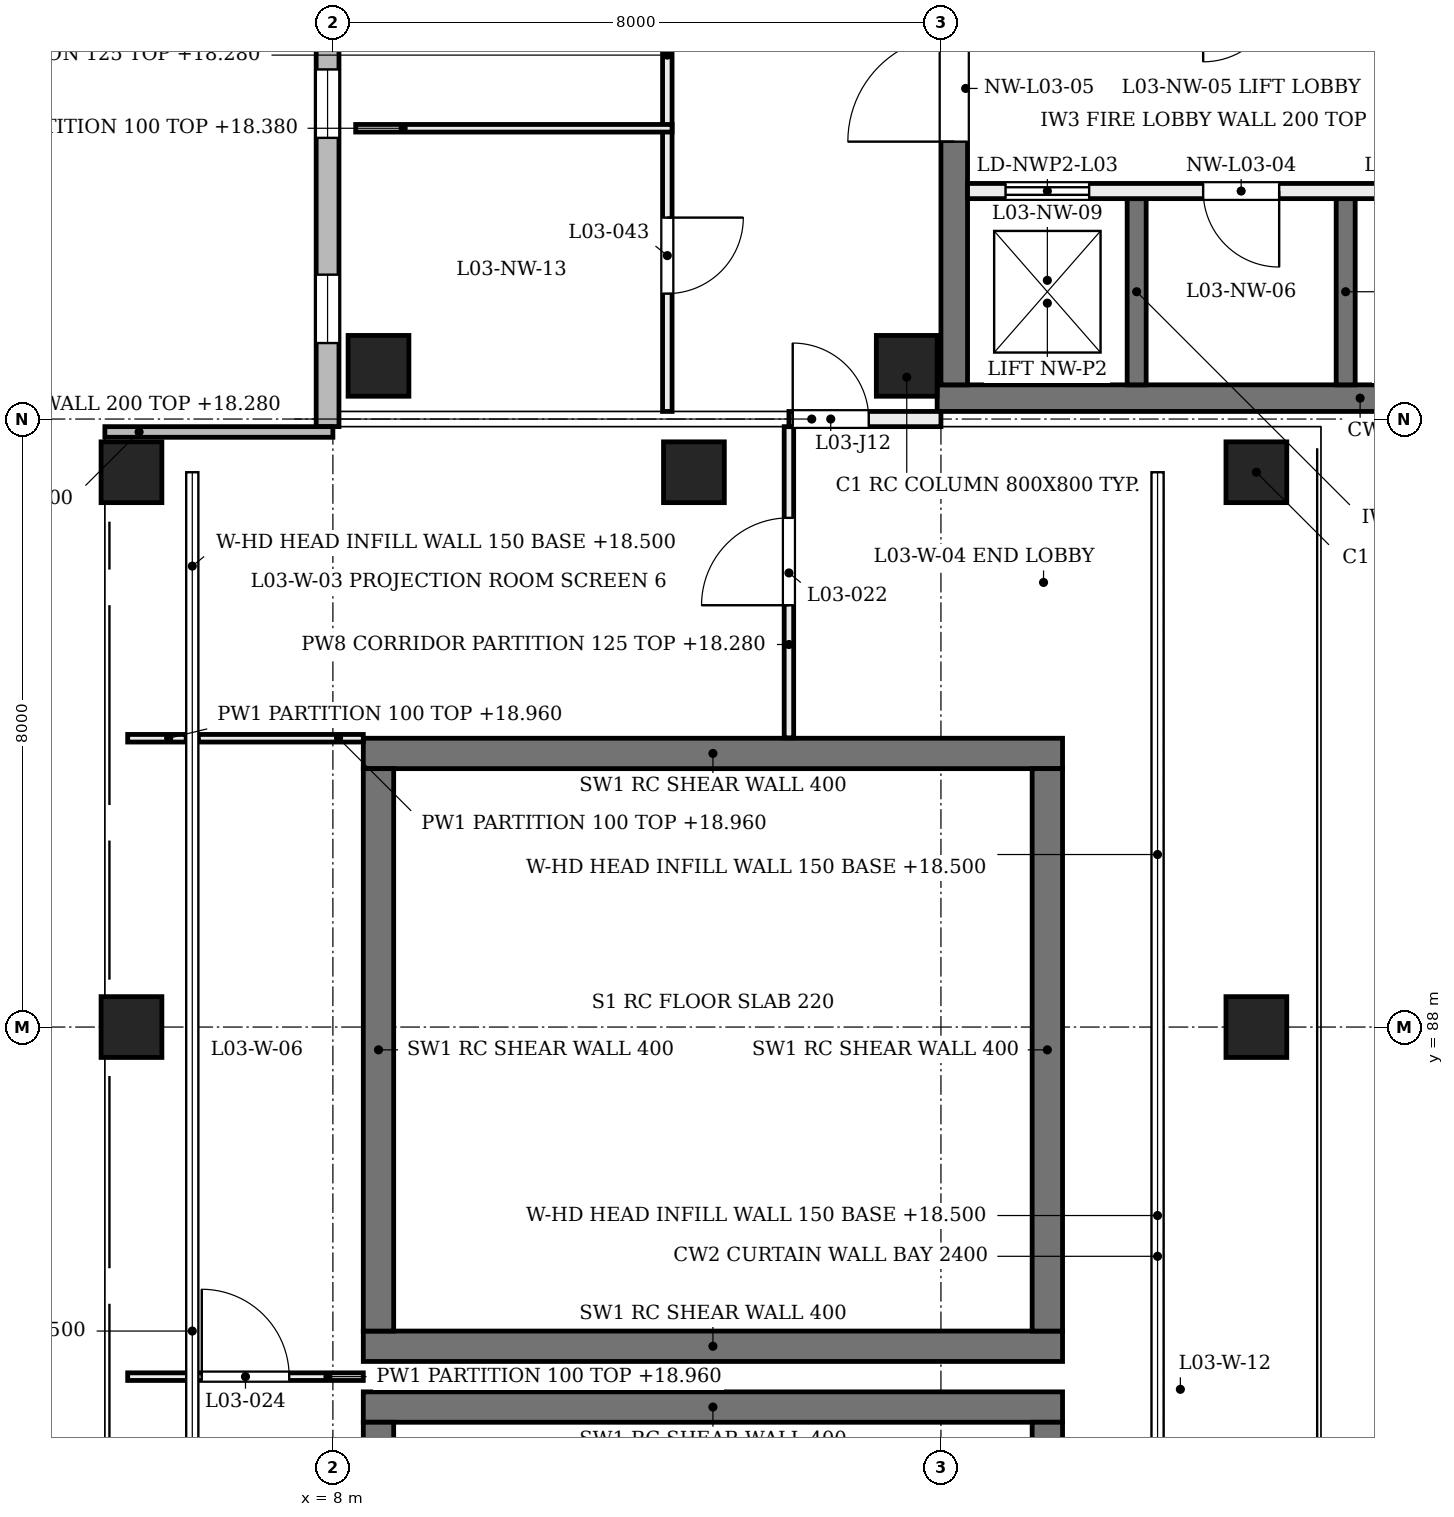
"""IFC4 building model, lengths in metres.
Left out: names, types, materials, properties, quantities, classifications, styles, units other than length and angle.
Written with IfcOpenShell. Run it as: python <this file> out.ifc"""

import sys

from ifc_helpers import new_model, si_unit, direction, frame, frame_2d, origin, origin_2d, place, context, subcontext, project, spatial, rectangle, extrude, element, fill, save


model = new_model("IFC4")
c1 = context("Model", 3, precision=1e-05, world=origin(), true_north=direction((0.0, 1.0)))
c2 = subcontext(c1, "Body", "Model", "MODEL_VIEW")
j1 = project(units=[si_unit("LENGTHUNIT", "METRE"), si_unit("PLANEANGLEUNIT", "RADIAN")], contexts=[c1])
p1 = place(None, origin())
s1 = spatial("IfcSite", under=j1, at=p1, CompositionType="ELEMENT")
p2 = place(p1, origin())
s2 = spatial("IfcBuilding", under=s1, at=p2, CompositionType="ELEMENT")
p3 = place(p2, frame((0.0, 0.0, 14.4)))
s3 = spatial("IfcBuildingStorey", under=s2, at=p3, CompositionType="ELEMENT", Elevation=14.4)
p4 = place(p3, frame((8.4, 83.0, 0.0), z_axis=(0.0, 0.0, 1.0), x_axis=(1.0, 0.0, 0.0)))
e1 = element("IfcWall", 1, at=p4, inside=s3, PredefinedType="SHEAR", context=c2, shape_type="SweptSolid", body=[
    extrude(rectangle(XDim=9.2, YDim=0.4, at=frame_2d((4.6, 0.0))), origin(), (0.0, 0.0, 1.0), 4.58),
])
for number, where, z_axis, x_axis in (
    (2, (8.6, 75.8, 0.0), (0.0, 0.0, 1.0), (0.0, 1.0, 0.0)),
    (3, (17.4, 75.8, 0.0), (0.0, 0.0, 1.0), (0.0, 1.0, 0.0)),
):
    element("IfcWall", number, at=place(p3, frame(where, z_axis=z_axis, x_axis=x_axis)), inside=s3, PredefinedType="SHEAR", context=c2, shape_type="SweptSolid", body=[
        extrude(rectangle(XDim=7.0, YDim=0.4, at=frame_2d((3.5, 0.0))), origin(), (0.0, 0.0, 1.0), 4.58),
    ])
for number, where, z_axis, x_axis in (
    (4, (8.4, 83.8, 0.0), (0.0, 0.0, 1.0), (1.0, 0.0, 0.0)),
    (5, (8.4, 91.6, 0.0), (0.0, 0.0, 1.0), (1.0, 0.0, 0.0)),
):
    element("IfcWall", number, at=place(p3, frame(where, z_axis=z_axis, x_axis=x_axis)), inside=s3, PredefinedType="SHEAR", context=c2, shape_type="SweptSolid", body=[
        extrude(rectangle(XDim=9.2, YDim=0.4, at=frame_2d((4.6, 0.0))), origin(), (0.0, 0.0, 1.0), 4.58),
    ])
for number, where, z_axis, x_axis in (
    (6, (8.6, 84.0, 0.0), (0.0, 0.0, 1.0), (0.0, 1.0, 0.0)),
    (7, (17.4, 84.0, 0.0), (0.0, 0.0, 1.0), (0.0, 1.0, 0.0)),
):
    element("IfcWall", number, at=place(p3, frame(where, z_axis=z_axis, x_axis=x_axis)), inside=s3, PredefinedType="SHEAR", context=c2, shape_type="SweptSolid", body=[
        extrude(rectangle(XDim=7.4, YDim=0.4, at=frame_2d((3.7, 0.0))), origin(), (0.0, 0.0, 1.0), 4.58),
    ])
p5 = place(p3, frame((15.95, 96.275, 0.0), z_axis=(0.0, 0.0, 1.0), x_axis=(1.0, 0.0, 0.0)))
e8 = element("IfcWall", 8, at=p5, inside=s3, PredefinedType="SHEAR", context=c2, shape_type="SweptSolid", body=[
    extrude(rectangle(XDim=7.95, YDim=0.35, at=frame_2d((3.975, 0.0))), origin(), (0.0, 0.0, 1.0), 4.58),
])
p6 = place(p3, frame((16.175, 96.45, 0.0), z_axis=(0.0, 0.0, 1.0), x_axis=(0.0, 1.0, 0.0)))
e9 = element("IfcWall", 9, at=p6, inside=s3, PredefinedType="SHEAR", context=c2, shape_type="SweptSolid", body=[
    extrude(rectangle(XDim=15.2, YDim=0.35, at=frame_2d((7.6, 0.0))), origin(), (0.0, 0.0, 1.0), 4.58),
])
p7 = place(p6, frame((13.25, 0.0, 0.0)))
e10 = element("IfcOpeningElement", 10, at=p7, cuts=e9, PredefinedType="OPENING", context=c2, shape_type="SweptSolid", body=[
    extrude(rectangle(XDim=1.0, YDim=2.1, at=frame_2d((0.5, 1.05))), frame((0.0, 0.185, 0.0), z_axis=(0.0, -1.0, 0.0), x_axis=(1.0, 0.0, 0.0)), (0.0, 0.0, 1.0), 0.37),
])
p8 = place(p6, frame((3.2, 0.0, 0.0)))
e11 = element("IfcOpeningElement", 11, at=p8, cuts=e9, PredefinedType="OPENING", context=c2, shape_type="SweptSolid", body=[
    extrude(rectangle(XDim=1.4, YDim=2.1, at=frame_2d((0.7, 1.05))), frame((0.0, 0.185, 0.0), z_axis=(0.0, -1.0, 0.0), x_axis=(1.0, 0.0, 0.0)), (0.0, 0.0, 1.0), 0.37),
])
for number, where, z_axis, x_axis in (
    (12, (8.6, 96.7, 0.0), (0.0, 0.0, 1.0), (1.0, 0.0, 0.0)),
    (13, (15.55, 96.7, 0.0), (0.0, 0.0, 1.0), (1.0, 0.0, 0.0)),
):
    element("IfcColumn", number, at=place(p3, frame(where, z_axis=z_axis, x_axis=x_axis)), inside=s3, PredefinedType="COLUMN", context=c2, shape_type="SweptSolid", body=[
        extrude(rectangle(XDim=0.8, YDim=0.8, at=origin_2d()), origin(), (0.0, 0.0, 1.0), 4.8),
    ])
for number, where, z_axis, x_axis in (
    (14, (5.6, 88.0, 0.0), (-0.204, 0.0, 0.979), (0.0, -1.0, 0.0)),
    (15, (5.6, 95.3, 0.0), (-0.204, 0.0, 0.979), (0.0, -1.0, 0.0)),
    (16, (13.0, 95.3, 0.0), (-0.204, 0.0, 0.979), (0.0, -1.0, 0.0)),
    (17, (20.4, 88.0, 0.0), (-0.204, 0.0, 0.979), (0.0, -1.0, 0.0)),
    (18, (20.4, 95.3, 0.0), (-0.204, 0.0, 0.979), (0.0, -1.0, 0.0)),
):
    element("IfcColumn", number, at=place(p3, frame(where, z_axis=z_axis, x_axis=x_axis)), inside=s3, PredefinedType="COLUMN", context=c2, shape_type="SweptSolid", body=[
        extrude(rectangle(XDim=0.8, YDim=0.8, at=origin_2d()), origin(), (0.0, 0.0, 1.0), 4.903),
    ])
p9 = place(p3, frame((6.15, 80.2, 4.1), z_axis=(0.0, 0.0, 1.0), x_axis=(0.0, 1.0, 0.0)))
e19 = element("IfcWall", 19, at=p9, inside=s3, PredefinedType="SOLIDWALL", context=c2, shape_type="SweptSolid", body=[
    extrude(rectangle(XDim=7.6, YDim=0.15, at=frame_2d((3.8, 0.0))), origin(), (0.0, 0.0, 1.0), 0.48),
])
p10 = place(p3, frame((6.15, 88.2, 4.1), z_axis=(0.0, 0.0, 1.0), x_axis=(0.0, 1.0, 0.0)))
e20 = element("IfcWall", 20, at=p10, inside=s3, PredefinedType="SOLIDWALL", context=c2, shape_type="SweptSolid", body=[
    extrude(rectangle(XDim=6.9, YDim=0.15, at=frame_2d((3.45, 0.0))), origin(), (0.0, 0.0, 1.0), 0.48),
])
p11 = place(p3, frame((18.85, 80.2, 4.1), z_axis=(0.0, 0.0, 1.0), x_axis=(0.0, 1.0, 0.0)))
e21 = element("IfcWall", 21, at=p11, inside=s3, PredefinedType="SOLIDWALL", context=c2, shape_type="SweptSolid", body=[
    extrude(rectangle(XDim=7.6, YDim=0.15, at=frame_2d((3.8, 0.0))), origin(), (0.0, 0.0, 1.0), 0.48),
])
p12 = place(p3, frame((18.85, 88.2, 4.1), z_axis=(0.0, 0.0, 1.0), x_axis=(0.0, 1.0, 0.0)))
e22 = element("IfcWall", 22, at=p12, inside=s3, PredefinedType="SOLIDWALL", context=c2, shape_type="SweptSolid", body=[
    extrude(rectangle(XDim=6.9, YDim=0.15, at=frame_2d((3.45, 0.0))), origin(), (0.0, 0.0, 1.0), 0.48),
])
p13 = place(p3, frame((7.93, 95.9, 0.0), z_axis=(0.0, 0.0, 1.0), x_axis=(0.0, 1.0, 0.0)))
e23 = element("IfcWall", 23, at=p13, inside=s3, PredefinedType="SOLIDWALL", context=c2, shape_type="SweptSolid", body=[
    extrude(rectangle(XDim=16.4, YDim=0.3, at=frame_2d((8.2, 0.0))), origin(), (0.0, 0.0, 1.0), 3.9),
])
p14 = place(p13, frame((1.1, 0.0, 0.75)))
e24 = element("IfcOpeningElement", 24, at=p14, cuts=e23, PredefinedType="OPENING", context=c2, shape_type="SweptSolid", body=[
    extrude(rectangle(XDim=0.9, YDim=3.1, at=frame_2d((0.45, 1.55))), frame((0.0, 0.16, 0.0), z_axis=(0.0, -1.0, 0.0), x_axis=(1.0, 0.0, 0.0)), (0.0, 0.0, 1.0), 0.32),
])
p15 = place(p13, frame((3.8, 0.0, 0.75)))
e25 = element("IfcOpeningElement", 25, at=p15, cuts=e23, PredefinedType="OPENING", context=c2, shape_type="SweptSolid", body=[
    extrude(rectangle(XDim=0.9, YDim=3.1, at=frame_2d((0.45, 1.55))), frame((0.0, 0.16, 0.0), z_axis=(0.0, -1.0, 0.0), x_axis=(1.0, 0.0, 0.0)), (0.0, 0.0, 1.0), 0.32),
])
p16 = place(p13, frame((6.5, 0.0, 0.75)))
e26 = element("IfcOpeningElement", 26, at=p16, cuts=e23, PredefinedType="OPENING", context=c2, shape_type="SweptSolid", body=[
    extrude(rectangle(XDim=0.9, YDim=3.1, at=frame_2d((0.45, 1.55))), frame((0.0, 0.16, 0.0), z_axis=(0.0, -1.0, 0.0), x_axis=(1.0, 0.0, 0.0)), (0.0, 0.0, 1.0), 0.32),
])
p17 = place(p13, frame((9.2, 0.0, 0.75)))
e27 = element("IfcOpeningElement", 27, at=p17, cuts=e23, PredefinedType="OPENING", context=c2, shape_type="SweptSolid", body=[
    extrude(rectangle(XDim=0.9, YDim=3.1, at=frame_2d((0.45, 1.55))), frame((0.0, 0.16, 0.0), z_axis=(0.0, -1.0, 0.0), x_axis=(1.0, 0.0, 0.0)), (0.0, 0.0, 1.0), 0.32),
])
p18 = place(p13, frame((11.9, 0.0, 0.75)))
e28 = element("IfcOpeningElement", 28, at=p18, cuts=e23, PredefinedType="OPENING", context=c2, shape_type="SweptSolid", body=[
    extrude(rectangle(XDim=0.9, YDim=3.1, at=frame_2d((0.45, 1.55))), frame((0.0, 0.16, 0.0), z_axis=(0.0, -1.0, 0.0), x_axis=(1.0, 0.0, 0.0)), (0.0, 0.0, 1.0), 0.32),
])
p19 = place(p13, frame((14.6, 0.0, 0.75)))
e29 = element("IfcOpeningElement", 29, at=p19, cuts=e23, PredefinedType="OPENING", context=c2, shape_type="SweptSolid", body=[
    extrude(rectangle(XDim=0.9, YDim=3.1, at=frame_2d((0.45, 1.55))), frame((0.0, 0.16, 0.0), z_axis=(0.0, -1.0, 0.0), x_axis=(1.0, 0.0, 0.0)), (0.0, 0.0, 1.0), 0.32),
])
p20 = place(p3, frame((5.0, 95.83, 0.0), z_axis=(0.0, 0.0, 1.0), x_axis=(1.0, 0.0, 0.0)))
e30 = element("IfcWall", 30, at=p20, inside=s3, PredefinedType="SOLIDWALL", context=c2, shape_type="SweptSolid", body=[
    extrude(rectangle(XDim=3.0, YDim=0.14, at=frame_2d((1.5, 0.0))), origin(), (0.0, 0.0, 1.0), 3.9),
])
for number, where, z_axis, x_axis in (
    (31, (18.575, 98.9, 0.0), (0.0, 0.0, 1.0), (0.0, -1.0, 0.0)),
    (32, (21.325, 98.9, 0.0), (0.0, 0.0, 1.0), (0.0, -1.0, 0.0)),
):
    element("IfcWall", number, at=place(p3, frame(where, z_axis=z_axis, x_axis=x_axis)), inside=s3, PredefinedType="SOLIDWALL", context=c2, shape_type="SweptSolid", body=[
        extrude(rectangle(XDim=2.45, YDim=0.25, at=frame_2d((1.225, 0.0))), origin(), (0.0, 0.0, 1.0), 4.55),
    ])
p21 = place(p3, frame((16.35, 99.0, 0.0), z_axis=(0.0, 0.0, 1.0), x_axis=(1.0, 0.0, 0.0)))
e33 = element("IfcWall", 33, at=p21, inside=s3, PredefinedType="SOLIDWALL", context=c2, shape_type="SweptSolid", body=[
    extrude(rectangle(XDim=7.2, YDim=0.2, at=frame_2d((3.6, 0.0))), origin(), (0.0, 0.0, 1.0), 4.55),
])
p22 = place(p21, frame((0.5, 0.0, 0.0)))
e34 = element("IfcOpeningElement", 34, at=p22, cuts=e33, PredefinedType="OPENING", context=c2, shape_type="SweptSolid", body=[
    extrude(rectangle(XDim=1.1, YDim=2.1, at=frame_2d((0.55, 1.05))), frame((0.0, 0.11, 0.0), z_axis=(0.0, -1.0, 0.0), x_axis=(1.0, 0.0, 0.0)), (0.0, 0.0, 1.0), 0.22),
])
p23 = place(p21, frame((5.6, 0.0, 0.0)))
e35 = element("IfcOpeningElement", 35, at=p23, cuts=e33, PredefinedType="OPENING", context=c2, shape_type="SweptSolid", body=[
    extrude(rectangle(XDim=1.1, YDim=2.1, at=frame_2d((0.55, 1.05))), frame((0.0, 0.11, 0.0), z_axis=(0.0, -1.0, 0.0), x_axis=(1.0, 0.0, 0.0)), (0.0, 0.0, 1.0), 0.22),
])
p24 = place(p21, frame((3.1, 0.0, 0.0)))
e36 = element("IfcOpeningElement", 36, at=p24, cuts=e33, PredefinedType="OPENING", context=c2, shape_type="SweptSolid", body=[
    extrude(rectangle(XDim=1.0, YDim=2.1, at=frame_2d((0.5, 1.05))), frame((0.0, 0.11, 0.0), z_axis=(0.0, -1.0, 0.0), x_axis=(1.0, 0.0, 0.0)), (0.0, 0.0, 1.0), 0.22),
])
p25 = place(p3, frame((14.0, 91.805, 0.0), z_axis=(0.0, 0.0, 1.0), x_axis=(0.0, 1.0, 0.0)))
e37 = element("IfcWall", 37, at=p25, inside=s3, PredefinedType="PARTITIONING", context=c2, shape_type="SweptSolid", body=[
    extrude(rectangle(XDim=4.095, YDim=0.125, at=frame_2d((2.047, 0.0))), origin(), (0.0, 0.0, 1.0), 3.88),
])
p26 = place(p25, frame((1.745, 0.0, 0.0)))
e38 = element("IfcOpeningElement", 38, at=p26, cuts=e37, PredefinedType="OPENING", context=c2, shape_type="SweptSolid", body=[
    extrude(rectangle(XDim=1.15, YDim=2.1, at=frame_2d((0.575, 1.05))), frame((0.0, 0.073, 0.0), z_axis=(0.0, -1.0, 0.0), x_axis=(1.0, 0.0, 0.0)), (0.0, 0.0, 1.0), 0.145),
])
p27 = place(p3, frame((5.3, 91.8, 0.0), z_axis=(0.0, 0.0, 1.0), x_axis=(1.0, 0.0, 0.0)))
e39 = element("IfcWall", 39, at=p27, inside=s3, PredefinedType="PARTITIONING", context=c2, shape_type="SweptSolid", body=[
    extrude(rectangle(XDim=0.77, YDim=0.1, at=frame_2d((0.385, 0.0))), origin(), (0.0, 0.0, 1.0), 4.56),
])
p28 = place(p3, frame((6.23, 91.8, 0.0), z_axis=(0.0, 0.0, 1.0), x_axis=(1.0, 0.0, 0.0)))
e40 = element("IfcWall", 40, at=p28, inside=s3, PredefinedType="PARTITIONING", context=c2, shape_type="SweptSolid", body=[
    extrude(rectangle(XDim=2.17, YDim=0.1, at=frame_2d((1.085, 0.0))), origin(), (0.0, 0.0, 1.0), 4.56),
])
p29 = place(p3, frame((12.4, 96.1, 0.0), z_axis=(0.0, 0.0, 1.0), x_axis=(0.0, 1.0, 0.0)))
e41 = element("IfcWall", 41, at=p29, inside=s3, PredefinedType="PARTITIONING", context=c2, shape_type="SweptSolid", body=[
    extrude(rectangle(XDim=9.377, YDim=0.125, at=frame_2d((4.688, 0.0))), origin(), (0.0, 0.0, 1.0), 3.88),
])
p30 = place(p29, frame((1.551, 0.0, 0.0)))
e42 = element("IfcOpeningElement", 42, at=p30, cuts=e41, PredefinedType="OPENING", context=c2, shape_type="SweptSolid", body=[
    extrude(rectangle(XDim=1.0, YDim=2.1, at=frame_2d((0.5, 1.05))), frame((0.0, 0.073, 0.0), z_axis=(0.0, -1.0, 0.0), x_axis=(1.0, 0.0, 0.0)), (0.0, 0.0, 1.0), 0.145),
])
p31 = place(p3, frame((8.3, 99.826, 0.0), z_axis=(0.0, 0.0, 1.0), x_axis=(1.0, 0.0, 0.0)))
e43 = element("IfcWall", 43, at=p31, inside=s3, PredefinedType="PARTITIONING", context=c2, shape_type="SweptSolid", body=[
    extrude(rectangle(XDim=4.162, YDim=0.1, at=frame_2d((2.081, 0.0))), origin(), (0.0, 0.0, 1.0), 3.98),
])
p32 = place(p3, frame((5.3, 83.4, 0.0), z_axis=(0.0, 0.0, 1.0), x_axis=(1.0, 0.0, 0.0)))
e44 = element("IfcWall", 44, at=p32, inside=s3, PredefinedType="PARTITIONING", context=c2, shape_type="SweptSolid", body=[
    extrude(rectangle(XDim=3.1, YDim=0.1, at=frame_2d((1.55, 0.0))), origin(), (0.0, 0.0, 1.0), 4.56),
])
p33 = place(p32, frame((0.975, 0.0, 0.0)))
e45 = element("IfcOpeningElement", 45, at=p33, cuts=e44, PredefinedType="OPENING", context=c2, shape_type="SweptSolid", body=[
    extrude(rectangle(XDim=1.15, YDim=2.1, at=frame_2d((0.575, 1.05))), frame((0.0, 0.06, 0.0), z_axis=(0.0, -1.0, 0.0), x_axis=(1.0, 0.0, 0.0)), (0.0, 0.0, 1.0), 0.12),
])
p34 = place(p3, frame((14.0, 96.0, 0.0), z_axis=(0.0, 0.0, 1.0), x_axis=(1.0, 0.0, 0.0)))
e46 = element("IfcWall", 46, at=p34, inside=s3, PredefinedType="PARTITIONING", context=c2, shape_type="SweptSolid", body=[
    extrude(rectangle(XDim=2.0, YDim=0.2, at=frame_2d((1.0, 0.0))), origin(), (0.0, 0.0, 1.0), 3.88),
])
p35 = place(p34, frame((0.05, 0.0, 0.0)))
e47 = element("IfcOpeningElement", 47, at=p35, cuts=e46, PredefinedType="OPENING", context=c2, shape_type="SweptSolid", body=[
    extrude(rectangle(XDim=1.0, YDim=2.1, at=frame_2d((0.5, 1.05))), frame((0.0, 0.11, 0.0), z_axis=(0.0, -1.0, 0.0), x_axis=(1.0, 0.0, 0.0)), (0.0, 0.0, 1.0), 0.22),
])
p36 = place(p2, frame((0.0, 0.0, 9.6)))
s4 = spatial("IfcBuildingStorey", under=s2, at=p36, CompositionType="ELEMENT", Elevation=9.6)
p37 = place(p36, frame((9.0, 75.8, 0.0), z_axis=(0.0, 0.0, 1.0), x_axis=(0.0, 1.0, 0.0)))
e48 = element("IfcWall", 48, at=p37, inside=s4, PredefinedType="PARTITIONING", context=c2, shape_type="SweptSolid", body=[
    extrude(rectangle(XDim=7.0, YDim=0.3, at=frame_2d((3.5, 0.0))), origin(), (0.0, 0.0, 1.0), 6.95),
])
p38 = place(p36, frame((9.0, 84.0, 0.0), z_axis=(0.0, 0.0, 1.0), x_axis=(0.0, 1.0, 0.0)))
e49 = element("IfcWall", 49, at=p38, inside=s4, PredefinedType="PARTITIONING", context=c2, shape_type="SweptSolid", body=[
    extrude(rectangle(XDim=7.4, YDim=0.3, at=frame_2d((3.7, 0.0))), origin(), (0.0, 0.0, 1.0), 6.95),
])
p39 = place(p14, origin())
e50 = element("IfcWindow", 50, at=p39, inside=s3, PartitioningType="SINGLE_PANEL", PredefinedType="WINDOW", context=c2, shape_type="SweptSolid", body=[
    extrude(rectangle(XDim=0.9, YDim=3.1, at=frame_2d((0.45, 1.55))), frame((0.0, 0.03, 0.0), z_axis=(0.0, -1.0, 0.0), x_axis=(1.0, 0.0, 0.0)), (0.0, 0.0, 1.0), 0.06),
])
fill(e24, e50)
p40 = place(p15, origin())
e51 = element("IfcWindow", 51, at=p40, inside=s3, PartitioningType="SINGLE_PANEL", PredefinedType="WINDOW", context=c2, shape_type="SweptSolid", body=[
    extrude(rectangle(XDim=0.9, YDim=3.1, at=frame_2d((0.45, 1.55))), frame((0.0, 0.03, 0.0), z_axis=(0.0, -1.0, 0.0), x_axis=(1.0, 0.0, 0.0)), (0.0, 0.0, 1.0), 0.06),
])
fill(e25, e51)
p41 = place(p22, origin())
e52 = element("IfcDoor", 52, at=p41, inside=s3, OperationType="DOUBLE_DOOR_SLIDING", PredefinedType="DOOR", context=c2, shape_type="SweptSolid", body=[
    extrude(rectangle(XDim=1.1, YDim=2.1, at=frame_2d((0.55, 1.05))), frame((0.0, 0.025, 0.0), z_axis=(0.0, -1.0, 0.0), x_axis=(1.0, 0.0, 0.0)), (0.0, 0.0, 1.0), 0.05),
])
fill(e34, e52)
p42 = place(p24, origin())
e53 = element("IfcDoor", 53, at=p42, inside=s3, OperationType="SINGLE_SWING_RIGHT", PredefinedType="DOOR", context=c2, shape_type="SweptSolid", body=[
    extrude(rectangle(XDim=1.0, YDim=2.1, at=frame_2d((0.5, 1.05))), frame((0.0, 0.025, 0.0), z_axis=(0.0, -1.0, 0.0), x_axis=(1.0, 0.0, 0.0)), (0.0, 0.0, 1.0), 0.05),
])
fill(e36, e53)
p43 = place(p8, origin())
e54 = element("IfcDoor", 54, at=p43, inside=s3, OperationType="SINGLE_SWING_LEFT", PredefinedType="DOOR", context=c2, shape_type="SweptSolid", body=[
    extrude(rectangle(XDim=1.4, YDim=2.1, at=frame_2d((0.7, 1.05))), frame((0.0, 0.025, 0.0), z_axis=(0.0, -1.0, 0.0), x_axis=(1.0, 0.0, 0.0)), (0.0, 0.0, 1.0), 0.05),
])
fill(e11, e54)
p44 = place(p26, origin())
e55 = element("IfcDoor", 55, at=p44, inside=s3, OperationType="SINGLE_SWING_LEFT", PredefinedType="DOOR", context=c2, shape_type="SweptSolid", body=[
    extrude(rectangle(XDim=1.15, YDim=2.1, at=frame_2d((0.575, 1.05))), frame((0.0, 0.025, 0.0), z_axis=(0.0, -1.0, 0.0), x_axis=(1.0, 0.0, 0.0)), (0.0, 0.0, 1.0), 0.05),
])
fill(e38, e55)
p45 = place(p33, origin())
e56 = element("IfcDoor", 56, at=p45, inside=s3, OperationType="SINGLE_SWING_LEFT", PredefinedType="DOOR", context=c2, shape_type="SweptSolid", body=[
    extrude(rectangle(XDim=1.15, YDim=2.1, at=frame_2d((0.575, 1.05))), frame((0.0, 0.025, 0.0), z_axis=(0.0, -1.0, 0.0), x_axis=(1.0, 0.0, 0.0)), (0.0, 0.0, 1.0), 0.05),
])
fill(e45, e56)
p46 = place(p30, origin())
e57 = element("IfcDoor", 57, at=p46, inside=s3, OperationType="SINGLE_SWING_RIGHT", PredefinedType="DOOR", context=c2, shape_type="SweptSolid", body=[
    extrude(rectangle(XDim=1.0, YDim=2.1, at=frame_2d((0.5, 1.05))), frame((0.0, 0.025, 0.0), z_axis=(0.0, -1.0, 0.0), x_axis=(1.0, 0.0, 0.0)), (0.0, 0.0, 1.0), 0.05),
])
fill(e42, e57)
p47 = place(p35, origin())
e58 = element("IfcDoor", 58, at=p47, inside=s3, OperationType="SINGLE_SWING_LEFT", PredefinedType="DOOR", context=c2, shape_type="SweptSolid", body=[
    extrude(rectangle(XDim=1.0, YDim=2.1, at=frame_2d((0.5, 1.05))), frame((0.0, 0.025, 0.0), z_axis=(0.0, -1.0, 0.0), x_axis=(1.0, 0.0, 0.0)), (0.0, 0.0, 1.0), 0.05),
])
fill(e47, e58)
save(model, sys.argv[1])
